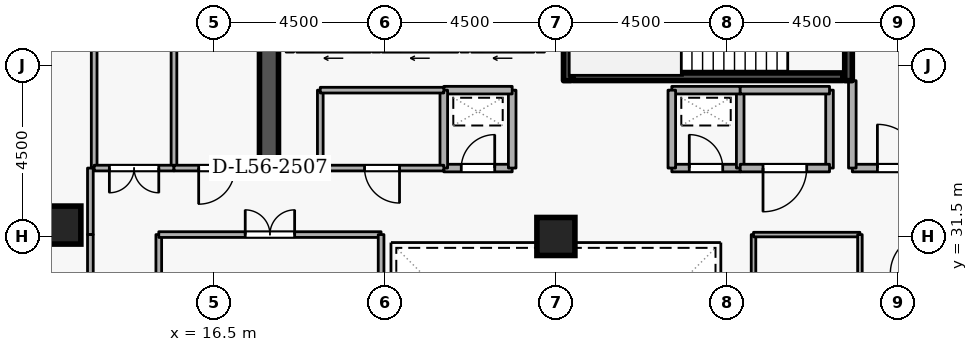
"""IFC4 building model, lengths in metres.
Left out: names, types, materials, properties, quantities, classifications, styles, units other than length and angle.
Written with IfcOpenShell. Run it as: python <this file> out.ifc"""

import sys

from ifc_helpers import new_model, si_unit, direction, frame, frame_2d, origin, origin_2d, place, context, subcontext, project, spatial, rectangle, extrude, element, fill, save


model = new_model("IFC4")
c1 = context("Model", 3, precision=1e-05, world=origin(), true_north=direction((0.0, 1.0)))
c2 = subcontext(c1, "Body", "Model", "MODEL_VIEW")
j1 = project(units=[si_unit("LENGTHUNIT", "METRE"), si_unit("PLANEANGLEUNIT", "RADIAN")], contexts=[c1])
p1 = place(None, origin())
s1 = spatial("IfcSite", under=j1, at=p1, CompositionType="ELEMENT")
p2 = place(p1, origin())
s2 = spatial("IfcBuilding", under=s1, at=p2, CompositionType="ELEMENT")
p3 = place(p2, frame((0.0, 0.0, 210.9)))
s3 = spatial("IfcBuildingStorey", under=s2, at=p3, CompositionType="ELEMENT", Elevation=210.9)
p4 = place(p3, frame((17.95, 33.1, 0.0), z_axis=(0.0, 0.0, 1.0), x_axis=(0.0, 1.0, 0.0)))
e1 = element("IfcWall", 1, at=p4, inside=s3, PredefinedType="SHEAR", context=c2, shape_type="SweptSolid", body=[
    extrude(rectangle(XDim=5.8, YDim=0.5, at=frame_2d((2.9, 0.0))), origin(), (0.0, 0.0, 1.0), 3.6),
])
for number, where, z_axis, x_axis in (
    (2, (12.5, 31.8, 0.0), (0.0, 0.0, 1.0), (1.0, 0.0, 0.0)),
    (3, (25.5, 31.5, 0.0), (0.0, 0.0, 1.0), (1.0, 0.0, 0.0)),
):
    element("IfcColumn", number, at=place(p3, frame(where, z_axis=z_axis, x_axis=x_axis)), inside=s3, PredefinedType="COLUMN", context=c2, shape_type="SweptSolid", body=[
        extrude(rectangle(XDim=1.0, YDim=1.0, at=origin_2d()), origin(), (0.0, 0.0, 1.0), 3.6),
    ])
p5 = place(p3, frame((24.92, 36.45, 0.0), z_axis=(0.0, 0.0, 1.0), x_axis=(-1.0, 0.0, 0.0)))
e4 = element("IfcWall", 4, at=p5, inside=s3, PredefinedType="STANDARD", context=c2, shape_type="SweptSolid", body=[
    extrude(rectangle(XDim=1.64, YDim=0.2, at=frame_2d((0.82, 0.0))), origin(), (0.0, 0.0, 1.0), 3.34),
])
p6 = place(p5, frame((0.31, 0.0, 0.0)))
e5 = element("IfcOpeningElement", 5, at=p6, cuts=e4, PredefinedType="OPENING", context=c2, shape_type="SweptSolid", body=[
    extrude(rectangle(XDim=1.02, YDim=2.06, at=frame_2d((0.51, 1.03))), frame((0.0, 0.11, 0.0), z_axis=(0.0, -1.0, 0.0), x_axis=(1.0, 0.0, 0.0)), (0.0, 0.0, 1.0), 0.22),
])
p7 = place(p3, frame((22.92, 36.45, 0.0), z_axis=(0.0, 0.0, 1.0), x_axis=(-1.0, 0.0, 0.0)))
e6 = element("IfcWall", 6, at=p7, inside=s3, PredefinedType="STANDARD", context=c2, shape_type="SweptSolid", body=[
    extrude(rectangle(XDim=1.99, YDim=0.2, at=frame_2d((0.995, 0.0))), origin(), (0.0, 0.0, 1.0), 3.34),
])
p8 = place(p7, frame((0.485, 0.0, 0.0)))
e7 = element("IfcOpeningElement", 7, at=p8, cuts=e6, PredefinedType="OPENING", context=c2, shape_type="SweptSolid", body=[
    extrude(rectangle(XDim=1.02, YDim=2.06, at=frame_2d((0.51, 1.03))), frame((0.0, 0.11, 0.0), z_axis=(0.0, -1.0, 0.0), x_axis=(1.0, 0.0, 0.0)), (0.0, 0.0, 1.0), 0.22),
])
p9 = place(p3, frame((20.62, 36.45, 0.0), z_axis=(0.0, 0.0, 1.0), x_axis=(-1.0, 0.0, 0.0)))
e8 = element("IfcWall", 8, at=p9, inside=s3, PredefinedType="STANDARD", context=c2, shape_type="SweptSolid", body=[
    extrude(rectangle(XDim=1.94, YDim=0.2, at=frame_2d((0.97, 0.0))), origin(), (0.0, 0.0, 1.0), 3.34),
])
p10 = place(p9, frame((0.46, 0.0, 0.0)))
e9 = element("IfcOpeningElement", 9, at=p10, cuts=e8, PredefinedType="OPENING", context=c2, shape_type="SweptSolid", body=[
    extrude(rectangle(XDim=1.02, YDim=2.06, at=frame_2d((0.51, 1.03))), frame((0.0, 0.11, 0.0), z_axis=(0.0, -1.0, 0.0), x_axis=(1.0, 0.0, 0.0)), (0.0, 0.0, 1.0), 0.22),
])
p11 = place(p3, frame((33.2, 38.95, 0.0), z_axis=(0.0, 0.0, 1.0), x_axis=(0.0, -1.0, 0.0)))
e10 = element("IfcWall", 10, at=p11, inside=s3, PredefinedType="SHEAR", context=c2, shape_type="SweptSolid", body=[
    extrude(rectangle(XDim=3.35, YDim=0.2, at=frame_2d((1.675, 0.0))), origin(), (0.0, 0.0, 1.0), 3.6),
])
p12 = place(p11, frame((1.125, 0.0, 0.0)))
e11 = element("IfcOpeningElement", 11, at=p12, cuts=e10, PredefinedType="OPENING", context=c2, shape_type="SweptSolid", body=[
    extrude(rectangle(XDim=1.1, YDim=2.1, at=frame_2d((0.55, 1.05))), frame((0.0, 0.11, 0.0), z_axis=(0.0, -1.0, 0.0), x_axis=(1.0, 0.0, 0.0)), (0.0, 0.0, 1.0), 0.22),
])
p13 = place(p3, frame((25.8, 35.6, 0.0), z_axis=(0.0, 0.0, 1.0), x_axis=(0.0, 1.0, 0.0)))
e12 = element("IfcWall", 12, at=p13, inside=s3, PredefinedType="SHEAR", context=c2, shape_type="SweptSolid", body=[
    extrude(rectangle(XDim=3.35, YDim=0.2, at=frame_2d((1.675, 0.0))), origin(), (0.0, 0.0, 1.0), 3.6),
])
p14 = place(p3, frame((25.95, 35.703, 0.0), z_axis=(0.0, 0.0, 1.0), x_axis=(1.0, 0.0, 0.0)))
e13 = element("IfcWall", 13, at=p14, inside=s3, PredefinedType="SHEAR", context=c2, shape_type="SweptSolid", body=[
    extrude(rectangle(XDim=7.1, YDim=0.2, at=frame_2d((3.55, 0.0))), origin(), (0.0, 0.0, 1.0), 3.6),
])
p15 = place(p3, frame((33.3, 33.3, 0.0), z_axis=(0.0, 0.0, 1.0), x_axis=(1.0, 0.0, 0.0)))
e14 = element("IfcWall", 14, at=p15, inside=s3, PredefinedType="STANDARD", context=c2, shape_type="SweptSolid", body=[
    extrude(rectangle(XDim=2.5, YDim=0.2, at=frame_2d((1.25, 0.0))), origin(), (0.0, 0.0, 1.0), 3.34),
])
p16 = place(p15, frame((0.66, 0.0, 0.0)))
e15 = element("IfcOpeningElement", 15, at=p16, cuts=e14, PredefinedType="OPENING", context=c2, shape_type="SweptSolid", body=[
    extrude(rectangle(XDim=1.15, YDim=2.1, at=frame_2d((0.575, 1.05))), frame((0.0, 0.11, 0.0), z_axis=(0.0, -1.0, 0.0), x_axis=(1.0, 0.0, 0.0)), (0.0, 0.0, 1.0), 0.22),
])
p17 = place(p3, frame((33.3, 35.6, 0.0), z_axis=(0.0, 0.0, 1.0), x_axis=(0.0, -1.0, 0.0)))
e16 = element("IfcWall", 16, at=p17, inside=s3, PredefinedType="STANDARD", context=c2, shape_type="SweptSolid", body=[
    extrude(rectangle(XDim=2.3, YDim=0.2, at=frame_2d((1.15, 0.0))), origin(), (0.0, 0.0, 1.0), 2.545),
])
p18 = place(p3, frame((22.55, 33.3, 0.0), z_axis=(0.0, 0.0, 1.0), x_axis=(1.0, 0.0, 0.0)))
e17 = element("IfcWall", 17, at=p18, inside=s3, PredefinedType="STANDARD", context=c2, shape_type="SweptSolid", body=[
    extrude(rectangle(XDim=1.8, YDim=0.2, at=frame_2d((0.9, 0.0))), origin(), (0.0, 0.0, 1.0), 3.34),
])
p19 = place(p18, frame((0.46, 0.0, 0.0)))
e18 = element("IfcOpeningElement", 18, at=p19, cuts=e17, PredefinedType="OPENING", context=c2, shape_type="SweptSolid", body=[
    extrude(rectangle(XDim=0.88, YDim=2.04, at=frame_2d((0.44, 1.02))), frame((0.0, 0.11, 0.0), z_axis=(0.0, -1.0, 0.0), x_axis=(1.0, 0.0, 0.0)), (0.0, 0.0, 1.0), 0.22),
])
p20 = place(p3, frame((24.35, 33.3, 0.0), z_axis=(0.0, 0.0, 1.0), x_axis=(0.0, 1.0, 0.0)))
e19 = element("IfcWall", 19, at=p20, inside=s3, PredefinedType="STANDARD", context=c2, shape_type="SweptSolid", body=[
    extrude(rectangle(XDim=2.05, YDim=0.2, at=frame_2d((1.025, 0.0))), origin(), (0.0, 0.0, 1.0), 3.34),
])
p21 = place(p3, frame((24.35, 35.35, 0.0), z_axis=(0.0, 0.0, 1.0), x_axis=(-1.0, 0.0, 0.0)))
e20 = element("IfcWall", 20, at=p21, inside=s3, PredefinedType="STANDARD", context=c2, shape_type="SweptSolid", body=[
    extrude(rectangle(XDim=1.8, YDim=0.2, at=frame_2d((0.9, 0.0))), origin(), (0.0, 0.0, 1.0), 3.34),
])
p22 = place(p3, frame((22.55, 35.35, 0.0), z_axis=(0.0, 0.0, 1.0), x_axis=(0.0, -1.0, 0.0)))
e21 = element("IfcWall", 21, at=p22, inside=s3, PredefinedType="STANDARD", context=c2, shape_type="SweptSolid", body=[
    extrude(rectangle(XDim=2.05, YDim=0.2, at=frame_2d((1.025, 0.0))), origin(), (0.0, 0.0, 1.0), 3.34),
])
p23 = place(p3, frame((28.55, 33.3, 0.0), z_axis=(0.0, 0.0, 1.0), x_axis=(1.0, 0.0, 0.0)))
e22 = element("IfcWall", 22, at=p23, inside=s3, PredefinedType="STANDARD", context=c2, shape_type="SweptSolid", body=[
    extrude(rectangle(XDim=1.8, YDim=0.2, at=frame_2d((0.9, 0.0))), origin(), (0.0, 0.0, 1.0), 3.34),
])
p24 = place(p23, frame((0.46, 0.0, 0.0)))
e23 = element("IfcOpeningElement", 23, at=p24, cuts=e22, PredefinedType="OPENING", context=c2, shape_type="SweptSolid", body=[
    extrude(rectangle(XDim=0.88, YDim=2.04, at=frame_2d((0.44, 1.02))), frame((0.0, 0.11, 0.0), z_axis=(0.0, -1.0, 0.0), x_axis=(1.0, 0.0, 0.0)), (0.0, 0.0, 1.0), 0.22),
])
p25 = place(p3, frame((30.35, 33.3, 0.0), z_axis=(0.0, 0.0, 1.0), x_axis=(0.0, 1.0, 0.0)))
e24 = element("IfcWall", 24, at=p25, inside=s3, PredefinedType="STANDARD", context=c2, shape_type="SweptSolid", body=[
    extrude(rectangle(XDim=2.05, YDim=0.2, at=frame_2d((1.025, 0.0))), origin(), (0.0, 0.0, 1.0), 3.34),
])
p26 = place(p3, frame((30.35, 35.35, 0.0), z_axis=(0.0, 0.0, 1.0), x_axis=(-1.0, 0.0, 0.0)))
e25 = element("IfcWall", 25, at=p26, inside=s3, PredefinedType="STANDARD", context=c2, shape_type="SweptSolid", body=[
    extrude(rectangle(XDim=1.8, YDim=0.2, at=frame_2d((0.9, 0.0))), origin(), (0.0, 0.0, 1.0), 3.34),
])
p27 = place(p3, frame((28.55, 35.35, 0.0), z_axis=(0.0, 0.0, 1.0), x_axis=(0.0, -1.0, 0.0)))
e26 = element("IfcWall", 26, at=p27, inside=s3, PredefinedType="STANDARD", context=c2, shape_type="SweptSolid", body=[
    extrude(rectangle(XDim=2.05, YDim=0.2, at=frame_2d((1.025, 0.0))), origin(), (0.0, 0.0, 1.0), 3.34),
])
p28 = place(p3, frame((32.7, 35.35, 0.0), z_axis=(0.0, 0.0, 1.0), x_axis=(0.0, -1.0, 0.0)))
e27 = element("IfcWall", 27, at=p28, inside=s3, PredefinedType="STANDARD", context=c2, shape_type="SweptSolid", body=[
    extrude(rectangle(XDim=2.05, YDim=0.2, at=frame_2d((1.025, 0.0))), origin(), (0.0, 0.0, 1.0), 2.545),
])
p29 = place(p3, frame((32.7, 33.3, 0.0), z_axis=(0.0, 0.0, 1.0), x_axis=(-1.0, 0.0, 0.0)))
e28 = element("IfcWall", 28, at=p29, inside=s3, PredefinedType="STANDARD", context=c2, shape_type="SweptSolid", body=[
    extrude(rectangle(XDim=2.35, YDim=0.2, at=frame_2d((1.175, 0.0))), origin(), (0.0, 0.0, 1.0), 3.34),
])
p30 = place(p29, frame((0.6, 0.0, 0.0)))
e29 = element("IfcOpeningElement", 29, at=p30, cuts=e28, PredefinedType="OPENING", context=c2, shape_type="SweptSolid", body=[
    extrude(rectangle(XDim=1.15, YDim=2.1, at=frame_2d((0.575, 1.05))), frame((0.0, 0.11, 0.0), z_axis=(0.0, -1.0, 0.0), x_axis=(1.0, 0.0, 0.0)), (0.0, 0.0, 1.0), 0.22),
])
p31 = place(p3, frame((30.35, 35.35, 0.0), z_axis=(0.0, 0.0, 1.0), x_axis=(1.0, 0.0, 0.0)))
e30 = element("IfcWall", 30, at=p31, inside=s3, PredefinedType="STANDARD", context=c2, shape_type="SweptSolid", body=[
    extrude(rectangle(XDim=2.35, YDim=0.2, at=frame_2d((1.175, 0.0))), origin(), (0.0, 0.0, 1.0), 3.34),
])
p32 = place(p3, frame((19.3, 33.3, 0.0), z_axis=(0.0, 0.0, 1.0), x_axis=(0.0, 1.0, 0.0)))
e31 = element("IfcWall", 31, at=p32, inside=s3, PredefinedType="PARTITIONING", context=c2, shape_type="SweptSolid", body=[
    extrude(rectangle(XDim=2.05, YDim=0.15, at=frame_2d((1.025, 0.0))), origin(), (0.0, 0.0, 1.0), 3.34),
])
p33 = place(p3, frame((19.3, 35.35, 0.0), z_axis=(0.0, 0.0, 1.0), x_axis=(1.0, 0.0, 0.0)))
e32 = element("IfcWall", 32, at=p33, inside=s3, PredefinedType="PARTITIONING", context=c2, shape_type="SweptSolid", body=[
    extrude(rectangle(XDim=3.25, YDim=0.15, at=frame_2d((1.625, 0.0))), origin(), (0.0, 0.0, 1.0), 3.34),
])
p34 = place(p3, frame((22.55, 33.3, 0.0), z_axis=(0.0, 0.0, 1.0), x_axis=(-1.0, 0.0, 0.0)))
e33 = element("IfcWall", 33, at=p34, inside=s3, PredefinedType="PARTITIONING", context=c2, shape_type="SweptSolid", body=[
    extrude(rectangle(XDim=3.25, YDim=0.15, at=frame_2d((1.625, 0.0))), origin(), (0.0, 0.0, 1.0), 3.34),
])
p35 = place(p34, frame((1.165, 0.0, 0.0)))
e34 = element("IfcOpeningElement", 34, at=p35, cuts=e33, PredefinedType="OPENING", context=c2, shape_type="SweptSolid", body=[
    extrude(rectangle(XDim=0.92, YDim=2.08, at=frame_2d((0.46, 1.04))), frame((0.0, 0.085, 0.0), z_axis=(0.0, -1.0, 0.0), x_axis=(1.0, 0.0, 0.0)), (0.0, 0.0, 1.0), 0.17),
])
for number, where, z_axis, x_axis in (
    (35, (13.35, 33.3, 0.0), (0.0, 0.0, 1.0), (0.0, 1.0, 0.0)),
    (36, (15.45, 50.72, 0.0), (0.0, 0.0, 1.0), (0.0, -1.0, 0.0)),
):
    element("IfcWall", number, at=place(p3, frame(where, z_axis=z_axis, x_axis=x_axis)), inside=s3, PredefinedType="PARTITIONING", context=c2, shape_type="SweptSolid", body=[
        extrude(rectangle(XDim=17.42, YDim=0.15, at=frame_2d((8.71, 0.0))), origin(), (0.0, 0.0, 1.0), 3.34),
    ])
p36 = place(p3, frame((15.45, 33.3, 0.0), z_axis=(0.0, 0.0, 1.0), x_axis=(-1.0, 0.0, 0.0)))
e37 = element("IfcWall", 37, at=p36, inside=s3, PredefinedType="PARTITIONING", context=c2, shape_type="SweptSolid", body=[
    extrude(rectangle(XDim=2.1, YDim=0.15, at=frame_2d((1.05, 0.0))), origin(), (0.0, 0.0, 1.0), 3.34),
])
p37 = place(p36, frame((0.4, 0.0, 0.0)))
e38 = element("IfcOpeningElement", 38, at=p37, cuts=e37, PredefinedType="OPENING", context=c2, shape_type="SweptSolid", body=[
    extrude(rectangle(XDim=1.3, YDim=2.12, at=frame_2d((0.65, 1.06))), frame((0.0, 0.085, 0.0), z_axis=(0.0, -1.0, 0.0), x_axis=(1.0, 0.0, 0.0)), (0.0, 0.0, 1.0), 0.17),
])
p38 = place(p3, frame((17.7, 33.3, 0.0), z_axis=(0.0, 0.0, 1.0), x_axis=(-1.0, 0.0, 0.0)))
e39 = element("IfcWall", 39, at=p38, inside=s3, PredefinedType="PARTITIONING", context=c2, shape_type="SweptSolid", body=[
    extrude(rectangle(XDim=2.25, YDim=0.15, at=frame_2d((1.125, 0.0))), origin(), (0.0, 0.0, 1.0), 3.34),
])
p39 = place(p38, frame((0.65, 0.0, 0.0)))
e40 = element("IfcOpeningElement", 40, at=p39, cuts=e39, PredefinedType="OPENING", context=c2, shape_type="SweptSolid", body=[
    extrude(rectangle(XDim=0.95, YDim=2.1, at=frame_2d((0.475, 1.05))), frame((0.0, 0.085, 0.0), z_axis=(0.0, -1.0, 0.0), x_axis=(1.0, 0.0, 0.0)), (0.0, 0.0, 1.0), 0.17),
])
p40 = place(p3, frame((13.25, 33.3, 0.0), z_axis=(0.0, 0.0, 1.0), x_axis=(0.0, -1.0, 0.0)))
e41 = element("IfcWall", 41, at=p40, inside=s3, PredefinedType="PARTITIONING", context=c2, shape_type="SweptSolid", body=[
    extrude(rectangle(XDim=1.75, YDim=0.15, at=frame_2d((0.875, 0.0))), origin(), (0.0, 0.0, 1.0), 3.34),
])
p41 = place(p3, frame((13.25, 31.55, 0.0), z_axis=(0.0, 0.0, 1.0), x_axis=(0.0, -1.0, 0.0)))
e42 = element("IfcWall", 42, at=p41, inside=s3, PredefinedType="PARTITIONING", context=c2, shape_type="SweptSolid", body=[
    extrude(rectangle(XDim=3.35, YDim=0.15, at=frame_2d((1.675, 0.0))), origin(), (0.0, 0.0, 1.0), 3.34),
])
p42 = place(p41, frame((1.025, 0.0, 0.0)))
e43 = element("IfcOpeningElement", 43, at=p42, cuts=e42, PredefinedType="OPENING", context=c2, shape_type="SweptSolid", body=[
    extrude(rectangle(XDim=1.3, YDim=2.12, at=frame_2d((0.65, 1.06))), frame((0.0, 0.085, 0.0), z_axis=(0.0, -1.0, 0.0), x_axis=(1.0, 0.0, 0.0)), (0.0, 0.0, 1.0), 0.17),
])
p43 = place(p3, frame((15.05, 28.2, 0.0), z_axis=(0.0, 0.0, 1.0), x_axis=(0.0, 1.0, 0.0)))
e44 = element("IfcWall", 44, at=p43, inside=s3, PredefinedType="PARTITIONING", context=c2, shape_type="SweptSolid", body=[
    extrude(rectangle(XDim=3.35, YDim=0.15, at=frame_2d((1.675, 0.0))), origin(), (0.0, 0.0, 1.0), 3.34),
])
p44 = place(p3, frame((15.05, 31.55, 0.0), z_axis=(0.0, 0.0, 1.0), x_axis=(1.0, 0.0, 0.0)))
e45 = element("IfcWall", 45, at=p44, inside=s3, PredefinedType="PARTITIONING", context=c2, shape_type="SweptSolid", body=[
    extrude(rectangle(XDim=5.85, YDim=0.15, at=frame_2d((2.925, 0.0))), origin(), (0.0, 0.0, 1.0), 3.34),
])
p45 = place(p44, frame((2.275, 0.0, 0.0)))
e46 = element("IfcOpeningElement", 46, at=p45, cuts=e45, PredefinedType="OPENING", context=c2, shape_type="SweptSolid", body=[
    extrude(rectangle(XDim=1.3, YDim=2.12, at=frame_2d((0.65, 1.06))), frame((0.0, 0.085, 0.0), z_axis=(0.0, -1.0, 0.0), x_axis=(1.0, 0.0, 0.0)), (0.0, 0.0, 1.0), 0.17),
])
p46 = place(p3, frame((20.9, 31.55, 0.0), z_axis=(0.0, 0.0, 1.0), x_axis=(0.0, -1.0, 0.0)))
e47 = element("IfcWall", 47, at=p46, inside=s3, PredefinedType="PARTITIONING", context=c2, shape_type="SweptSolid", body=[
    extrude(rectangle(XDim=3.35, YDim=0.15, at=frame_2d((1.675, 0.0))), origin(), (0.0, 0.0, 1.0), 3.34),
])
p47 = place(p3, frame((30.7, 27.0, 0.0), z_axis=(0.0, 0.0, 1.0), x_axis=(0.0, 1.0, 0.0)))
e48 = element("IfcWall", 48, at=p47, inside=s3, PredefinedType="PARTITIONING", context=c2, shape_type="SweptSolid", body=[
    extrude(rectangle(XDim=4.55, YDim=0.12, at=frame_2d((2.275, 0.0))), origin(), (0.0, 0.0, 1.0), 3.34),
])
p48 = place(p3, frame((30.7, 31.55, 0.0), z_axis=(0.0, 0.0, 1.0), x_axis=(1.0, 0.0, 0.0)))
e49 = element("IfcWall", 49, at=p48, inside=s3, PredefinedType="PARTITIONING", context=c2, shape_type="SweptSolid", body=[
    extrude(rectangle(XDim=2.8, YDim=0.12, at=frame_2d((1.4, 0.0))), origin(), (0.0, 0.0, 1.0), 3.34),
])
p49 = place(p3, frame((33.5, 31.55, 0.0), z_axis=(0.0, 0.0, 1.0), x_axis=(0.0, -1.0, 0.0)))
e50 = element("IfcWall", 50, at=p49, inside=s3, PredefinedType="PARTITIONING", context=c2, shape_type="SweptSolid", body=[
    extrude(rectangle(XDim=4.55, YDim=0.12, at=frame_2d((2.275, 0.0))), origin(), (0.0, 0.0, 1.0), 3.34),
])
p50 = place(p49, frame((1.8, 0.0, 0.0)))
e51 = element("IfcOpeningElement", 51, at=p50, cuts=e50, PredefinedType="OPENING", context=c2, shape_type="SweptSolid", body=[
    extrude(rectangle(XDim=0.95, YDim=2.1, at=frame_2d((0.475, 1.05))), frame((0.0, 0.07, 0.0), z_axis=(0.0, -1.0, 0.0), x_axis=(1.0, 0.0, 0.0)), (0.0, 0.0, 1.0), 0.14),
])
p51 = place(p16, origin())
e52 = element("IfcDoor", 52, at=p51, inside=s3, OperationType="SINGLE_SWING_LEFT", PredefinedType="DOOR", context=c2, shape_type="SweptSolid", body=[
    extrude(rectangle(XDim=1.15, YDim=2.1, at=frame_2d((0.575, 1.05))), frame((0.0, 0.025, 0.0), z_axis=(0.0, -1.0, 0.0), x_axis=(1.0, 0.0, 0.0)), (0.0, 0.0, 1.0), 0.05),
])
fill(e15, e52)
p52 = place(p19, origin())
e53 = element("IfcDoor", 53, at=p52, inside=s3, OperationType="SINGLE_SWING_RIGHT", PredefinedType="DOOR", context=c2, shape_type="SweptSolid", body=[
    extrude(rectangle(XDim=0.88, YDim=2.04, at=frame_2d((0.44, 1.02))), frame((0.0, 0.025, 0.0), z_axis=(0.0, -1.0, 0.0), x_axis=(1.0, 0.0, 0.0)), (0.0, 0.0, 1.0), 0.05),
])
fill(e18, e53)
p53 = place(p24, origin())
e54 = element("IfcDoor", 54, at=p53, inside=s3, OperationType="SINGLE_SWING_LEFT", PredefinedType="DOOR", context=c2, shape_type="SweptSolid", body=[
    extrude(rectangle(XDim=0.88, YDim=2.04, at=frame_2d((0.44, 1.02))), frame((0.0, 0.025, 0.0), z_axis=(0.0, -1.0, 0.0), x_axis=(1.0, 0.0, 0.0)), (0.0, 0.0, 1.0), 0.05),
])
fill(e23, e54)
p54 = place(p35, origin())
e55 = element("IfcDoor", 55, at=p54, inside=s3, OperationType="SINGLE_SWING_LEFT", PredefinedType="DOOR", context=c2, shape_type="SweptSolid", body=[
    extrude(rectangle(XDim=0.92, YDim=2.08, at=frame_2d((0.46, 1.04))), frame((0.0, 0.025, 0.0), z_axis=(0.0, -1.0, 0.0), x_axis=(1.0, 0.0, 0.0)), (0.0, 0.0, 1.0), 0.05),
])
fill(e34, e55)
p55 = place(p30, origin())
e56 = element("IfcDoor", 56, at=p55, inside=s3, OperationType="SINGLE_SWING_RIGHT", PredefinedType="DOOR", context=c2, shape_type="SweptSolid", body=[
    extrude(rectangle(XDim=1.15, YDim=2.1, at=frame_2d((0.575, 1.05))), frame((0.0, 0.025, 0.0), z_axis=(0.0, -1.0, 0.0), x_axis=(1.0, 0.0, 0.0)), (0.0, 0.0, 1.0), 0.05),
])
fill(e29, e56)
p56 = place(p37, origin())
e57 = element("IfcDoor", 57, at=p56, inside=s3, OperationType="DOUBLE_DOOR_SINGLE_SWING", PredefinedType="DOOR", context=c2, shape_type="SweptSolid", body=[
    extrude(rectangle(XDim=1.3, YDim=2.12, at=frame_2d((0.65, 1.06))), frame((0.0, 0.025, 0.0), z_axis=(0.0, -1.0, 0.0), x_axis=(1.0, 0.0, 0.0)), (0.0, 0.0, 1.0), 0.05),
])
fill(e38, e57)
p57 = place(p39, origin())
e58 = element("IfcDoor", 58, at=p57, inside=s3, OperationType="SINGLE_SWING_RIGHT", PredefinedType="DOOR", context=c2, shape_type="SweptSolid", body=[
    extrude(rectangle(XDim=0.95, YDim=2.1, at=frame_2d((0.475, 1.05))), frame((0.0, 0.025, 0.0), z_axis=(0.0, -1.0, 0.0), x_axis=(1.0, 0.0, 0.0)), (0.0, 0.0, 1.0), 0.05),
])
fill(e40, e58)
p58 = place(p45, origin())
e59 = element("IfcDoor", 59, at=p58, inside=s3, OperationType="DOUBLE_DOOR_SINGLE_SWING", PredefinedType="DOOR", context=c2, shape_type="SweptSolid", body=[
    extrude(rectangle(XDim=1.3, YDim=2.12, at=frame_2d((0.65, 1.06))), frame((0.0, 0.025, 0.0), z_axis=(0.0, -1.0, 0.0), x_axis=(1.0, 0.0, 0.0)), (0.0, 0.0, 1.0), 0.05),
])
fill(e46, e59)
save(model, sys.argv[1])
